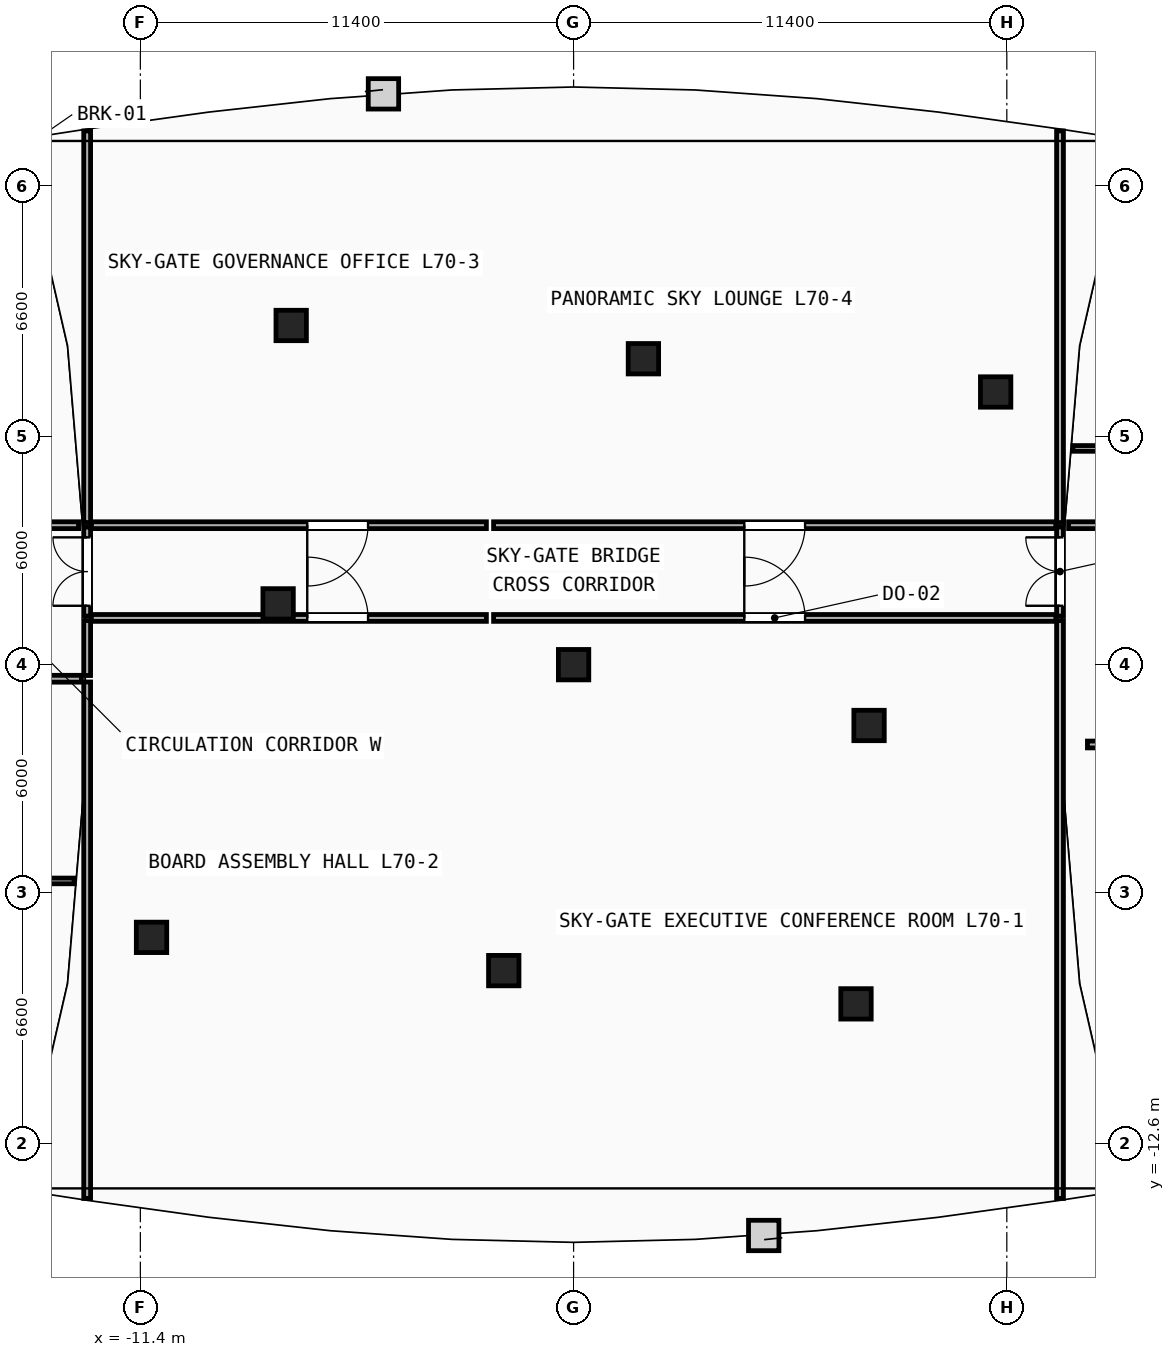
"""IFC4 building model, lengths in metres.
Left out: names, types, materials, properties, quantities, classifications, styles, units other than length and angle.
Written with IfcOpenShell. Run it as: python <this file> out.ifc"""

import sys

from ifc_helpers import new_model, si_unit, direction, frame, frame_2d, origin, origin_2d, place, context, subcontext, project, spatial, rectangle, extrude, element, fill, save


model = new_model("IFC4")
c1 = context("Model", 3, precision=1e-05, world=origin(), true_north=direction((0.0, 1.0)))
c2 = subcontext(c1, "Body", "Model", "MODEL_VIEW")
j1 = project(units=[si_unit("LENGTHUNIT", "METRE"), si_unit("PLANEANGLEUNIT", "RADIAN")], contexts=[c1])
p1 = place(None, origin())
s1 = spatial("IfcSite", under=j1, at=p1, CompositionType="ELEMENT")
p2 = place(p1, origin())
s2 = spatial("IfcBuilding", under=s1, at=p2, CompositionType="ELEMENT")
p3 = place(p2, frame((0.0, 0.0, 264.8)))
s3 = spatial("IfcBuildingStorey", under=s2, at=p3, CompositionType="ELEMENT", Elevation=264.8)
for number, where, z_axis, x_axis in (
    (1, (-11.106, -7.175, 0.0), (0.0, 0.0, 1.0), (1.0, 0.0, 0.0)),
    (2, (-1.837, -8.05, 0.0), (0.0, 0.0, 1.0), (1.0, 0.0, 0.0)),
    (3, (7.431, -8.925, 0.0), (0.0, 0.0, 1.0), (1.0, 0.0, 0.0)),
    (4, (-7.775, 1.6, 0.0), (0.0, 0.0, 1.0), (1.0, 0.0, 0.0)),
    (5, (0.0, 0.0, 0.0), (0.0, 0.0, 1.0), (1.0, 0.0, 0.0)),
    (6, (7.775, -1.6, 0.0), (0.0, 0.0, 1.0), (1.0, 0.0, 0.0)),
    (7, (-7.431, 8.925, 0.0), (0.0, 0.0, 1.0), (1.0, 0.0, 0.0)),
    (8, (1.837, 8.05, 0.0), (0.0, 0.0, 1.0), (1.0, 0.0, 0.0)),
    (9, (11.106, 7.175, 0.0), (0.0, 0.0, 1.0), (1.0, 0.0, 0.0)),
):
    element("IfcColumn", number, at=place(p3, frame(where, z_axis=z_axis, x_axis=x_axis)), inside=s3, PredefinedType="COLUMN", context=c2, shape_type="SweptSolid", body=[
        extrude(rectangle(XDim=0.8, YDim=0.8, at=origin_2d()), origin(), (0.0, 0.0, 1.0), 3.6),
    ])
p4 = place(p3, frame((-28.35, -5.69, 0.0), z_axis=(0.0, 0.0, 1.0), x_axis=(1.0, 0.0, 0.0)))
e10 = element("IfcWall", 10, at=p4, inside=s3, PredefinedType="PARTITIONING", context=c2, shape_type="SweptSolid", body=[
    extrude(rectangle(XDim=15.21, YDim=0.15, at=frame_2d((7.605, 0.0))), origin(), (0.0, 0.0, 1.0), 3.34),
])
p5 = place(p3, frame((-28.3, -0.37, 0.0), z_axis=(0.0, 0.0, 1.0), x_axis=(1.0, 0.0, 0.0)))
e11 = element("IfcWall", 11, at=p5, inside=s3, PredefinedType="PARTITIONING", context=c2, shape_type="SweptSolid", body=[
    extrude(rectangle(XDim=15.349, YDim=0.18, at=frame_2d((7.675, 0.0))), origin(), (0.0, 0.0, 1.0), 3.34),
])
p6 = place(p5, frame((7.175, 0.0, 0.0)))
e12 = element("IfcOpeningElement", 12, at=p6, cuts=e11, PredefinedType="OPENING", context=c2, shape_type="SweptSolid", body=[
    extrude(rectangle(XDim=1.0, YDim=2.15, at=frame_2d((0.5, 1.075))), frame((0.0, 0.1, 0.0), z_axis=(0.0, -1.0, 0.0), x_axis=(1.0, 0.0, 0.0)), (0.0, 0.0, 1.0), 0.2),
])
p7 = place(p3, frame((-13.026, 3.67, 0.0), z_axis=(0.0, 0.0, 1.0), x_axis=(-1.0, 0.0, 0.0)))
e13 = element("IfcWall", 13, at=p7, inside=s3, PredefinedType="PARTITIONING", context=c2, shape_type="SweptSolid", body=[
    extrude(rectangle(XDim=3.753, YDim=0.18, at=frame_2d((1.876, 0.0))), origin(), (0.0, 0.0, 1.0), 3.34),
])
p8 = place(p3, frame((13.14, 5.69, 0.0), z_axis=(0.0, 0.0, 1.0), x_axis=(1.0, 0.0, 0.0)))
e14 = element("IfcWall", 14, at=p8, inside=s3, PredefinedType="PARTITIONING", context=c2, shape_type="SweptSolid", body=[
    extrude(rectangle(XDim=15.21, YDim=0.15, at=frame_2d((7.605, 0.0))), origin(), (0.0, 0.0, 1.0), 3.34),
])
p9 = place(p3, frame((13.521, -2.1, 0.0), z_axis=(0.0, 0.0, 1.0), x_axis=(1.0, 0.0, 0.0)))
e15 = element("IfcWall", 15, at=p9, inside=s3, PredefinedType="PARTITIONING", context=c2, shape_type="SweptSolid", body=[
    extrude(rectangle(XDim=7.398, YDim=0.18, at=frame_2d((3.699, 0.0))), origin(), (0.0, 0.0, 1.0), 3.34),
])
p10 = place(p9, frame((3.199, 0.0, 0.0)))
e16 = element("IfcOpeningElement", 16, at=p10, cuts=e15, PredefinedType="OPENING", context=c2, shape_type="SweptSolid", body=[
    extrude(rectangle(XDim=1.0, YDim=2.15, at=frame_2d((0.5, 1.075))), frame((0.0, 0.1, 0.0), z_axis=(0.0, -1.0, 0.0), x_axis=(1.0, 0.0, 0.0)), (0.0, 0.0, 1.0), 0.2),
])
p11 = place(p3, frame((16.779, 3.67, 0.0), z_axis=(0.0, 0.0, 1.0), x_axis=(-1.0, 0.0, 0.0)))
e17 = element("IfcWall", 17, at=p11, inside=s3, PredefinedType="PARTITIONING", context=c2, shape_type="SweptSolid", body=[
    extrude(rectangle(XDim=3.753, YDim=0.18, at=frame_2d((1.876, 0.0))), origin(), (0.0, 0.0, 1.0), 3.34),
])
p12 = place(p3, frame((-2.105, 1.23, 0.0), z_axis=(0.0, 0.0, 1.0), x_axis=(1.0, 0.0, 0.0)))
e18 = element("IfcWall", 18, at=p12, inside=s3, PredefinedType="PARTITIONING", context=c2, shape_type="SweptSolid", body=[
    extrude(rectangle(XDim=14.793, YDim=0.18, at=frame_2d((7.397, 0.0))), origin(), (0.0, 0.0, 1.0), 3.34),
])
p13 = place(p12, frame((6.597, 0.0, 0.0)))
e19 = element("IfcOpeningElement", 19, at=p13, cuts=e18, PredefinedType="OPENING", context=c2, shape_type="SweptSolid", body=[
    extrude(rectangle(XDim=1.6, YDim=2.2, at=frame_2d((0.8, 1.1))), frame((0.0, 0.1, 0.0), z_axis=(0.0, -1.0, 0.0), x_axis=(1.0, 0.0, 0.0)), (0.0, 0.0, 1.0), 0.2),
])
p14 = place(p3, frame((-12.688, 1.23, 0.0), z_axis=(0.0, 0.0, 1.0), x_axis=(1.0, 0.0, 0.0)))
e20 = element("IfcWall", 20, at=p14, inside=s3, PredefinedType="PARTITIONING", context=c2, shape_type="SweptSolid", body=[
    extrude(rectangle(XDim=10.394, YDim=0.18, at=frame_2d((5.197, 0.0))), origin(), (0.0, 0.0, 1.0), 2.663),
])
p15 = place(p14, frame((5.68, 0.0, 0.0)))
e21 = element("IfcOpeningElement", 21, at=p15, cuts=e20, PredefinedType="OPENING", context=c2, shape_type="SweptSolid", body=[
    extrude(rectangle(XDim=1.6, YDim=2.2, at=frame_2d((0.8, 1.1))), frame((0.0, 0.1, 0.0), z_axis=(0.0, -1.0, 0.0), x_axis=(1.0, 0.0, 0.0)), (0.0, 0.0, 1.0), 0.2),
])
p16 = place(p3, frame((-2.295, 3.67, 0.0), z_axis=(0.0, 0.0, 1.0), x_axis=(-1.0, 0.0, 0.0)))
e22 = element("IfcWall", 22, at=p16, inside=s3, PredefinedType="PARTITIONING", context=c2, shape_type="SweptSolid", body=[
    extrude(rectangle(XDim=10.394, YDim=0.18, at=frame_2d((5.197, 0.0))), origin(), (0.0, 0.0, 1.0), 3.34),
])
p17 = place(p16, frame((3.114, 0.0, 0.0)))
e23 = element("IfcOpeningElement", 23, at=p17, cuts=e22, PredefinedType="OPENING", context=c2, shape_type="SweptSolid", body=[
    extrude(rectangle(XDim=1.6, YDim=2.2, at=frame_2d((0.8, 1.1))), frame((0.0, 0.1, 0.0), z_axis=(0.0, -1.0, 0.0), x_axis=(1.0, 0.0, 0.0)), (0.0, 0.0, 1.0), 0.2),
])
p18 = place(p3, frame((12.688, 3.67, 0.0), z_axis=(0.0, 0.0, 1.0), x_axis=(-1.0, 0.0, 0.0)))
e24 = element("IfcWall", 24, at=p18, inside=s3, PredefinedType="PARTITIONING", context=c2, shape_type="SweptSolid", body=[
    extrude(rectangle(XDim=14.793, YDim=0.18, at=frame_2d((7.397, 0.0))), origin(), (0.0, 0.0, 1.0), 3.34),
])
p19 = place(p18, frame((6.597, 0.0, 0.0)))
e25 = element("IfcOpeningElement", 25, at=p19, cuts=e24, PredefinedType="OPENING", context=c2, shape_type="SweptSolid", body=[
    extrude(rectangle(XDim=1.6, YDim=2.2, at=frame_2d((0.8, 1.1))), frame((0.0, 0.1, 0.0), z_axis=(0.0, -1.0, 0.0), x_axis=(1.0, 0.0, 0.0)), (0.0, 0.0, 1.0), 0.2),
])
p20 = place(p3, frame((-12.8, -14.044, 0.0), z_axis=(0.0, 0.0, 1.0), x_axis=(0.0, 1.0, 0.0)))
e26 = element("IfcWall", 26, at=p20, inside=s3, PredefinedType="PARTITIONING", context=c2, shape_type="SweptSolid", body=[
    extrude(rectangle(XDim=13.589, YDim=0.18, at=frame_2d((6.794, 0.0))), origin(), (0.0, 0.0, 1.0), 3.34),
])
p21 = place(p3, frame((-12.8, -0.285, 0.0), z_axis=(0.0, 0.0, 1.0), x_axis=(0.0, 1.0, 0.0)))
e27 = element("IfcWall", 27, at=p21, inside=s3, PredefinedType="PARTITIONING", context=c2, shape_type="SweptSolid", body=[
    extrude(rectangle(XDim=1.445, YDim=0.18, at=frame_2d((0.722, 0.0))), origin(), (0.0, 0.0, 1.0), 3.34),
])
p22 = place(p3, frame((-12.8, 3.74, 0.0), z_axis=(0.0, 0.0, 1.0), x_axis=(0.0, 1.0, 0.0)))
e28 = element("IfcWall", 28, at=p22, inside=s3, PredefinedType="PARTITIONING", context=c2, shape_type="SweptSolid", body=[
    extrude(rectangle(XDim=10.304, YDim=0.18, at=frame_2d((5.152, 0.0))), origin(), (0.0, 0.0, 1.0), 3.34),
])
p23 = place(p3, frame((-12.8, 1.28, 0.0), z_axis=(0.0, 0.0, 1.0), x_axis=(0.0, 1.0, 0.0)))
e29 = element("IfcWall", 29, at=p23, inside=s3, PredefinedType="PARTITIONING", context=c2, shape_type="SweptSolid", body=[
    extrude(rectangle(XDim=2.34, YDim=0.18, at=frame_2d((1.17, 0.0))), origin(), (0.0, 0.0, 1.0), 3.34),
])
p24 = place(p23, frame((0.27, 0.0, 0.0)))
e30 = element("IfcOpeningElement", 30, at=p24, cuts=e29, PredefinedType="OPENING", context=c2, shape_type="SweptSolid", body=[
    extrude(rectangle(XDim=1.8, YDim=2.25, at=frame_2d((0.9, 1.125))), frame((0.0, 0.1, 0.0), z_axis=(0.0, -1.0, 0.0), x_axis=(1.0, 0.0, 0.0)), (0.0, 0.0, 1.0), 0.2),
])
p25 = place(p3, frame((12.8, -14.044, 0.0), z_axis=(0.0, 0.0, 1.0), x_axis=(0.0, 1.0, 0.0)))
e31 = element("IfcWall", 31, at=p25, inside=s3, PredefinedType="PARTITIONING", context=c2, shape_type="SweptSolid", body=[
    extrude(rectangle(XDim=15.204, YDim=0.18, at=frame_2d((7.602, 0.0))), origin(), (0.0, 0.0, 1.0), 3.34),
])
p26 = place(p3, frame((12.8, 3.74, 0.0), z_axis=(0.0, 0.0, 1.0), x_axis=(0.0, 1.0, 0.0)))
e32 = element("IfcWall", 32, at=p26, inside=s3, PredefinedType="PARTITIONING", context=c2, shape_type="SweptSolid", body=[
    extrude(rectangle(XDim=10.304, YDim=0.18, at=frame_2d((5.152, 0.0))), origin(), (0.0, 0.0, 1.0), 3.34),
])
p27 = place(p3, frame((12.8, 1.28, 0.0), z_axis=(0.0, 0.0, 1.0), x_axis=(0.0, 1.0, 0.0)))
e33 = element("IfcWall", 33, at=p27, inside=s3, PredefinedType="PARTITIONING", context=c2, shape_type="SweptSolid", body=[
    extrude(rectangle(XDim=2.34, YDim=0.18, at=frame_2d((1.17, 0.0))), origin(), (0.0, 0.0, 1.0), 3.34),
])
p28 = place(p27, frame((0.27, 0.0, 0.0)))
e34 = element("IfcOpeningElement", 34, at=p28, cuts=e33, PredefinedType="OPENING", context=c2, shape_type="SweptSolid", body=[
    extrude(rectangle(XDim=1.8, YDim=2.25, at=frame_2d((0.9, 1.125))), frame((0.0, 0.1, 0.0), z_axis=(0.0, -1.0, 0.0), x_axis=(1.0, 0.0, 0.0)), (0.0, 0.0, 1.0), 0.2),
])
p29 = place(p13, origin())
e35 = element("IfcDoor", 35, at=p29, inside=s3, OperationType="SINGLE_SWING_LEFT", PredefinedType="DOOR", context=c2, shape_type="SweptSolid", body=[
    extrude(rectangle(XDim=1.6, YDim=2.2, at=frame_2d((0.8, 1.1))), frame((0.0, 0.025, 0.0), z_axis=(0.0, -1.0, 0.0), x_axis=(1.0, 0.0, 0.0)), (0.0, 0.0, 1.0), 0.05),
])
fill(e19, e35)
p30 = place(p19, origin())
e36 = element("IfcDoor", 36, at=p30, inside=s3, OperationType="SINGLE_SWING_RIGHT", PredefinedType="DOOR", context=c2, shape_type="SweptSolid", body=[
    extrude(rectangle(XDim=1.6, YDim=2.2, at=frame_2d((0.8, 1.1))), frame((0.0, 0.025, 0.0), z_axis=(0.0, -1.0, 0.0), x_axis=(1.0, 0.0, 0.0)), (0.0, 0.0, 1.0), 0.05),
])
fill(e25, e36)
p31 = place(p15, origin())
e37 = element("IfcDoor", 37, at=p31, inside=s3, OperationType="SINGLE_SWING_LEFT", PredefinedType="DOOR", context=c2, shape_type="SweptSolid", body=[
    extrude(rectangle(XDim=1.6, YDim=2.2, at=frame_2d((0.8, 1.1))), frame((0.0, 0.025, 0.0), z_axis=(0.0, -1.0, 0.0), x_axis=(1.0, 0.0, 0.0)), (0.0, 0.0, 1.0), 0.05),
])
fill(e21, e37)
p32 = place(p17, origin())
e38 = element("IfcDoor", 38, at=p32, inside=s3, OperationType="SINGLE_SWING_RIGHT", PredefinedType="DOOR", context=c2, shape_type="SweptSolid", body=[
    extrude(rectangle(XDim=1.6, YDim=2.2, at=frame_2d((0.8, 1.1))), frame((0.0, 0.025, 0.0), z_axis=(0.0, -1.0, 0.0), x_axis=(1.0, 0.0, 0.0)), (0.0, 0.0, 1.0), 0.05),
])
fill(e23, e38)
p33 = place(p24, origin())
e39 = element("IfcDoor", 39, at=p33, inside=s3, OperationType="DOUBLE_DOOR_SINGLE_SWING", PredefinedType="DOOR", context=c2, shape_type="SweptSolid", body=[
    extrude(rectangle(XDim=1.8, YDim=2.25, at=frame_2d((0.9, 1.125))), frame((0.0, 0.025, 0.0), z_axis=(0.0, -1.0, 0.0), x_axis=(1.0, 0.0, 0.0)), (0.0, 0.0, 1.0), 0.05),
])
fill(e30, e39)
p34 = place(p28, origin())
e40 = element("IfcDoor", 40, at=p34, inside=s3, OperationType="DOUBLE_DOOR_SINGLE_SWING", PredefinedType="DOOR", context=c2, shape_type="SweptSolid", body=[
    extrude(rectangle(XDim=1.8, YDim=2.25, at=frame_2d((0.9, 1.125))), frame((0.0, 0.025, 0.0), z_axis=(0.0, -1.0, 0.0), x_axis=(1.0, 0.0, 0.0)), (0.0, 0.0, 1.0), 0.05),
])
fill(e34, e40)
save(model, sys.argv[1])
